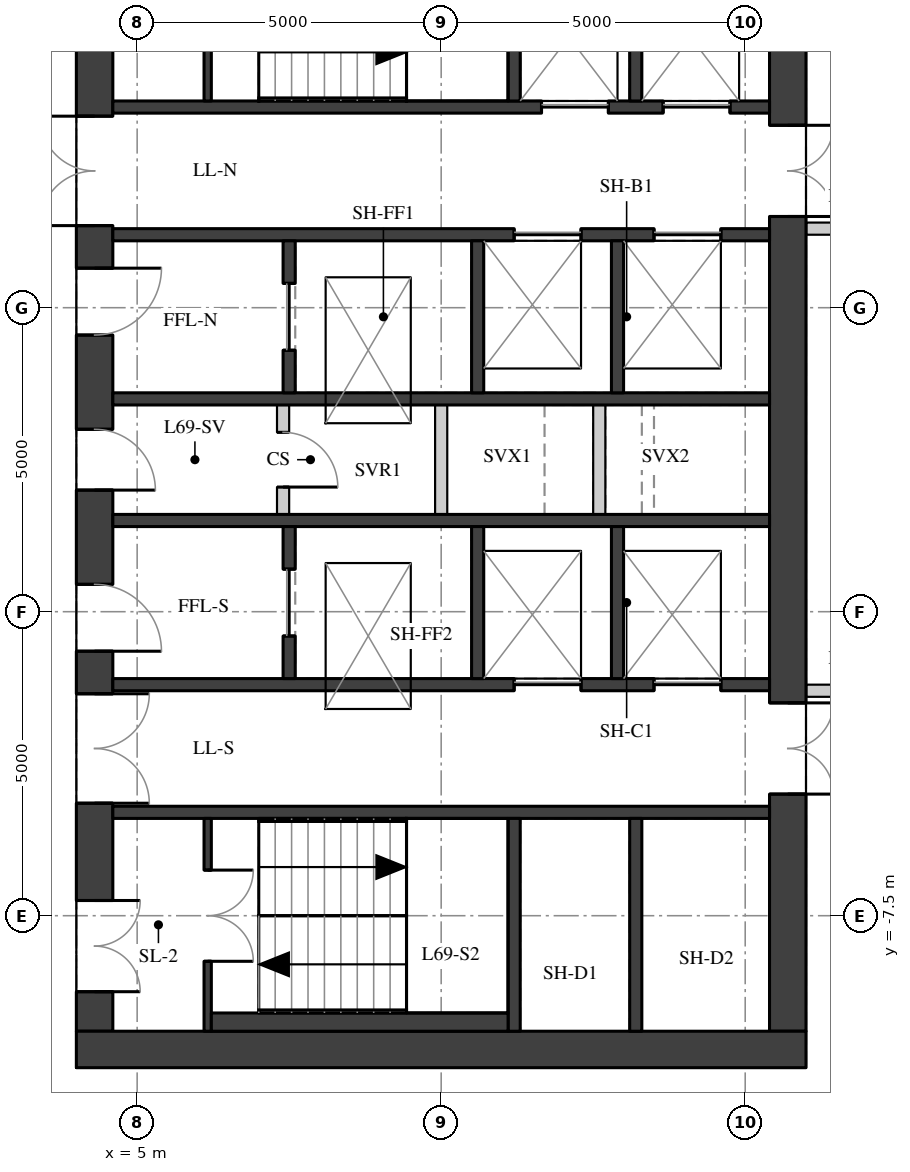
"""IFC4 building model, lengths in metres.
Left out: names, types, materials, properties, quantities, classifications, styles, units other than length and angle.
Written with IfcOpenShell. Run it as: python <this file> out.ifc"""

import sys

from ifc_helpers import new_model, si_unit, direction, frame, frame_2d, origin, place, context, subcontext, project, spatial, rectangle, extrude, element, fill, save


model = new_model("IFC4")
c1 = context("Model", 3, precision=1e-05, world=origin(), true_north=direction((0.0, 1.0)))
c2 = subcontext(c1, "Body", "Model", "MODEL_VIEW")
j1 = project(units=[si_unit("LENGTHUNIT", "METRE"), si_unit("PLANEANGLEUNIT", "RADIAN")], contexts=[c1])
p1 = place(None, origin())
s1 = spatial("IfcSite", under=j1, at=p1, CompositionType="ELEMENT")
p2 = place(p1, origin())
s2 = spatial("IfcBuilding", under=s1, at=p2, CompositionType="ELEMENT")
p3 = place(p2, frame((0.0, 0.0, 243.2)))
s3 = spatial("IfcBuildingStorey", under=s2, at=p3, CompositionType="ELEMENT", Elevation=243.2)
p4 = place(p3, frame((4.3, -9.4, 0.0), z_axis=(0.0, 0.0, 1.0), x_axis=(0.0, 1.0, 0.0)))
e1 = element("IfcWall", 1, at=p4, inside=s3, PredefinedType="SHEAR", context=c2, shape_type="SweptSolid", body=[
    extrude(rectangle(XDim=18.8, YDim=0.6, at=frame_2d((9.4, 0.0))), origin(), (0.0, 0.0, 1.0), 3.02),
])
p5 = place(p4, frame((0.65, 0.0, 0.0)))
e2 = element("IfcOpeningElement", 2, at=p5, cuts=e1, PredefinedType="OPENING", context=c2, shape_type="SweptSolid", body=[
    extrude(rectangle(XDim=1.5, YDim=2.1, at=frame_2d((0.75, 1.05))), frame((0.0, 0.31, 0.0), z_axis=(0.0, -1.0, 0.0), x_axis=(1.0, 0.0, 0.0)), (0.0, 0.0, 1.0), 0.62),
])
p6 = place(p4, frame((3.75, 0.0, 0.0)))
e3 = element("IfcOpeningElement", 3, at=p6, cuts=e1, PredefinedType="OPENING", context=c2, shape_type="SweptSolid", body=[
    extrude(rectangle(XDim=1.8, YDim=2.1, at=frame_2d((0.9, 1.05))), frame((0.0, 0.31, 0.0), z_axis=(0.0, -1.0, 0.0), x_axis=(1.0, 0.0, 0.0)), (0.0, 0.0, 1.0), 0.62),
])
p7 = place(p4, frame((6.25, 0.0, 0.0)))
e4 = element("IfcOpeningElement", 4, at=p7, cuts=e1, PredefinedType="OPENING", context=c2, shape_type="SweptSolid", body=[
    extrude(rectangle(XDim=1.1, YDim=2.1, at=frame_2d((0.55, 1.05))), frame((0.0, 0.31, 0.0), z_axis=(0.0, -1.0, 0.0), x_axis=(1.0, 0.0, 0.0)), (0.0, 0.0, 1.0), 0.62),
])
p8 = place(p4, frame((8.9, 0.0, 0.0)))
e5 = element("IfcOpeningElement", 5, at=p8, cuts=e1, PredefinedType="OPENING", context=c2, shape_type="SweptSolid", body=[
    extrude(rectangle(XDim=1.0, YDim=2.1, at=frame_2d((0.5, 1.05))), frame((0.0, 0.31, 0.0), z_axis=(0.0, -1.0, 0.0), x_axis=(1.0, 0.0, 0.0)), (0.0, 0.0, 1.0), 0.62),
])
p9 = place(p4, frame((11.45, 0.0, 0.0)))
e6 = element("IfcOpeningElement", 6, at=p9, cuts=e1, PredefinedType="OPENING", context=c2, shape_type="SweptSolid", body=[
    extrude(rectangle(XDim=1.1, YDim=2.1, at=frame_2d((0.55, 1.05))), frame((0.0, 0.31, 0.0), z_axis=(0.0, -1.0, 0.0), x_axis=(1.0, 0.0, 0.0)), (0.0, 0.0, 1.0), 0.62),
])
p10 = place(p4, frame((13.25, 0.0, 0.0)))
e7 = element("IfcOpeningElement", 7, at=p10, cuts=e1, PredefinedType="OPENING", context=c2, shape_type="SweptSolid", body=[
    extrude(rectangle(XDim=1.8, YDim=2.1, at=frame_2d((0.9, 1.05))), frame((0.0, 0.31, 0.0), z_axis=(0.0, -1.0, 0.0), x_axis=(1.0, 0.0, 0.0)), (0.0, 0.0, 1.0), 0.62),
])
p11 = place(p4, frame((16.65, 0.0, 0.0)))
e8 = element("IfcOpeningElement", 8, at=p11, cuts=e1, PredefinedType="OPENING", context=c2, shape_type="SweptSolid", body=[
    extrude(rectangle(XDim=1.5, YDim=2.1, at=frame_2d((0.75, 1.05))), frame((0.0, 0.31, 0.0), z_axis=(0.0, -1.0, 0.0), x_axis=(1.0, 0.0, 0.0)), (0.0, 0.0, 1.0), 0.62),
])
p12 = place(p3, frame((15.7, -9.4, 0.0), z_axis=(0.0, 0.0, 1.0), x_axis=(0.0, 1.0, 0.0)))
e9 = element("IfcWall", 9, at=p12, inside=s3, PredefinedType="SHEAR", context=c2, shape_type="SweptSolid", body=[
    extrude(rectangle(XDim=18.8, YDim=0.6, at=frame_2d((9.4, 0.0))), origin(), (0.0, 0.0, 1.0), 3.02),
])
p13 = place(p12, frame((13.4, 0.0, 0.0)))
e10 = element("IfcOpeningElement", 10, at=p13, cuts=e9, PredefinedType="OPENING", context=c2, shape_type="SweptSolid", body=[
    extrude(rectangle(XDim=1.5, YDim=2.1, at=frame_2d((0.75, 1.05))), frame((0.0, 0.31, 0.0), z_axis=(0.0, -1.0, 0.0), x_axis=(1.0, 0.0, 0.0)), (0.0, 0.0, 1.0), 0.62),
])
p14 = place(p12, frame((3.9, 0.0, 0.0)))
e11 = element("IfcOpeningElement", 11, at=p14, cuts=e9, PredefinedType="OPENING", context=c2, shape_type="SweptSolid", body=[
    extrude(rectangle(XDim=1.5, YDim=2.1, at=frame_2d((0.75, 1.05))), frame((0.0, 0.31, 0.0), z_axis=(0.0, -1.0, 0.0), x_axis=(1.0, 0.0, 0.0)), (0.0, 0.0, 1.0), 0.62),
])
p15 = place(p3, frame((4.0, -9.7, 0.0), z_axis=(0.0, 0.0, 1.0), x_axis=(1.0, 0.0, 0.0)))
e12 = element("IfcWall", 12, at=p15, inside=s3, PredefinedType="SHEAR", context=c2, shape_type="SweptSolid", body=[
    extrude(rectangle(XDim=12.0, YDim=0.6, at=frame_2d((6.0, 0.0))), origin(), (0.0, 0.0, 1.0), 3.02),
])
p16 = place(p3, frame((4.6, 5.8, 0.0), z_axis=(0.0, 0.0, 1.0), x_axis=(1.0, 0.0, 0.0)))
e13 = element("IfcWall", 13, at=p16, inside=s3, PredefinedType="SHEAR", context=c2, shape_type="SweptSolid", body=[
    extrude(rectangle(XDim=10.8, YDim=0.2, at=frame_2d((5.4, 0.0))), origin(), (0.0, 0.0, 1.0), 3.02),
])
p17 = place(p16, frame((7.05, 0.0, 0.0)))
e14 = element("IfcOpeningElement", 14, at=p17, cuts=e13, PredefinedType="OPENING", context=c2, shape_type="SweptSolid", body=[
    extrude(rectangle(XDim=1.1, YDim=2.1, at=frame_2d((0.55, 1.05))), frame((0.0, 0.11, 0.0), z_axis=(0.0, -1.0, 0.0), x_axis=(1.0, 0.0, 0.0)), (0.0, 0.0, 1.0), 0.22),
])
p18 = place(p16, frame((9.05, 0.0, 0.0)))
e15 = element("IfcOpeningElement", 15, at=p18, cuts=e13, PredefinedType="OPENING", context=c2, shape_type="SweptSolid", body=[
    extrude(rectangle(XDim=1.1, YDim=2.1, at=frame_2d((0.55, 1.05))), frame((0.0, 0.11, 0.0), z_axis=(0.0, -1.0, 0.0), x_axis=(1.0, 0.0, 0.0)), (0.0, 0.0, 1.0), 0.22),
])
p19 = place(p3, frame((4.6, 3.7, 0.0), z_axis=(0.0, 0.0, 1.0), x_axis=(1.0, 0.0, 0.0)))
e16 = element("IfcWall", 16, at=p19, inside=s3, PredefinedType="SHEAR", context=c2, shape_type="SweptSolid", body=[
    extrude(rectangle(XDim=10.8, YDim=0.2, at=frame_2d((5.4, 0.0))), origin(), (0.0, 0.0, 1.0), 3.02),
])
p20 = place(p19, frame((6.6, 0.0, 0.0)))
e17 = element("IfcOpeningElement", 17, at=p20, cuts=e16, PredefinedType="OPENING", context=c2, shape_type="SweptSolid", body=[
    extrude(rectangle(XDim=1.1, YDim=2.1, at=frame_2d((0.55, 1.05))), frame((0.0, 0.11, 0.0), z_axis=(0.0, -1.0, 0.0), x_axis=(1.0, 0.0, 0.0)), (0.0, 0.0, 1.0), 0.22),
])
p21 = place(p19, frame((8.9, 0.0, 0.0)))
e18 = element("IfcOpeningElement", 18, at=p21, cuts=e16, PredefinedType="OPENING", context=c2, shape_type="SweptSolid", body=[
    extrude(rectangle(XDim=1.1, YDim=2.1, at=frame_2d((0.55, 1.05))), frame((0.0, 0.11, 0.0), z_axis=(0.0, -1.0, 0.0), x_axis=(1.0, 0.0, 0.0)), (0.0, 0.0, 1.0), 0.22),
])
for number, where, z_axis, x_axis in (
    (19, (4.6, 1.0, 0.0), (0.0, 0.0, 1.0), (1.0, 0.0, 0.0)),
    (20, (4.6, -1.0, 0.0), (0.0, 0.0, 1.0), (1.0, 0.0, 0.0)),
):
    element("IfcWall", number, at=place(p3, frame(where, z_axis=z_axis, x_axis=x_axis)), inside=s3, PredefinedType="SHEAR", context=c2, shape_type="SweptSolid", body=[
        extrude(rectangle(XDim=10.8, YDim=0.2, at=frame_2d((5.4, 0.0))), origin(), (0.0, 0.0, 1.0), 3.02),
    ])
p22 = place(p3, frame((4.6, -3.7, 0.0), z_axis=(0.0, 0.0, 1.0), x_axis=(1.0, 0.0, 0.0)))
e21 = element("IfcWall", 21, at=p22, inside=s3, PredefinedType="SHEAR", context=c2, shape_type="SweptSolid", body=[
    extrude(rectangle(XDim=10.8, YDim=0.2, at=frame_2d((5.4, 0.0))), origin(), (0.0, 0.0, 1.0), 3.02),
])
p23 = place(p22, frame((6.6, 0.0, 0.0)))
e22 = element("IfcOpeningElement", 22, at=p23, cuts=e21, PredefinedType="OPENING", context=c2, shape_type="SweptSolid", body=[
    extrude(rectangle(XDim=1.1, YDim=2.1, at=frame_2d((0.55, 1.05))), frame((0.0, 0.11, 0.0), z_axis=(0.0, -1.0, 0.0), x_axis=(1.0, 0.0, 0.0)), (0.0, 0.0, 1.0), 0.22),
])
p24 = place(p22, frame((8.9, 0.0, 0.0)))
e23 = element("IfcOpeningElement", 23, at=p24, cuts=e21, PredefinedType="OPENING", context=c2, shape_type="SweptSolid", body=[
    extrude(rectangle(XDim=1.1, YDim=2.1, at=frame_2d((0.55, 1.05))), frame((0.0, 0.11, 0.0), z_axis=(0.0, -1.0, 0.0), x_axis=(1.0, 0.0, 0.0)), (0.0, 0.0, 1.0), 0.22),
])
p25 = place(p3, frame((4.6, -5.8, 0.0), z_axis=(0.0, 0.0, 1.0), x_axis=(1.0, 0.0, 0.0)))
e24 = element("IfcWall", 24, at=p25, inside=s3, PredefinedType="SHEAR", context=c2, shape_type="SweptSolid", body=[
    extrude(rectangle(XDim=10.8, YDim=0.2, at=frame_2d((5.4, 0.0))), origin(), (0.0, 0.0, 1.0), 3.02),
])
for number, where, z_axis, x_axis in (
    (25, (11.2, 5.9, 0.0), (0.0, 0.0, 1.0), (0.0, 1.0, 0.0)),
    (26, (11.2, -9.4, 0.0), (0.0, 0.0, 1.0), (0.0, 1.0, 0.0)),
    (27, (13.2, 5.9, 0.0), (0.0, 0.0, 1.0), (0.0, 1.0, 0.0)),
    (28, (13.2, -9.4, 0.0), (0.0, 0.0, 1.0), (0.0, 1.0, 0.0)),
):
    element("IfcWall", number, at=place(p3, frame(where, z_axis=z_axis, x_axis=x_axis)), inside=s3, PredefinedType="SHEAR", context=c2, shape_type="SweptSolid", body=[
        extrude(rectangle(XDim=3.5, YDim=0.2, at=frame_2d((1.75, 0.0))), origin(), (0.0, 0.0, 1.0), 3.02),
    ])
p26 = place(p3, frame((7.5, 1.1, 0.0), z_axis=(0.0, 0.0, 1.0), x_axis=(0.0, 1.0, 0.0)))
e29 = element("IfcWall", 29, at=p26, inside=s3, PredefinedType="SHEAR", context=c2, shape_type="SweptSolid", body=[
    extrude(rectangle(XDim=2.5, YDim=0.2, at=frame_2d((1.25, 0.0))), origin(), (0.0, 0.0, 1.0), 3.02),
])
p27 = place(p26, frame((0.7, 0.0, 0.0)))
e30 = element("IfcOpeningElement", 30, at=p27, cuts=e29, PredefinedType="OPENING", context=c2, shape_type="SweptSolid", body=[
    extrude(rectangle(XDim=1.1, YDim=2.1, at=frame_2d((0.55, 1.05))), frame((0.0, 0.11, 0.0), z_axis=(0.0, -1.0, 0.0), x_axis=(1.0, 0.0, 0.0)), (0.0, 0.0, 1.0), 0.22),
])
p28 = place(p3, frame((7.5, -3.6, 0.0), z_axis=(0.0, 0.0, 1.0), x_axis=(0.0, 1.0, 0.0)))
e31 = element("IfcWall", 31, at=p28, inside=s3, PredefinedType="SHEAR", context=c2, shape_type="SweptSolid", body=[
    extrude(rectangle(XDim=2.5, YDim=0.2, at=frame_2d((1.25, 0.0))), origin(), (0.0, 0.0, 1.0), 3.02),
])
p29 = place(p28, frame((0.7, 0.0, 0.0)))
e32 = element("IfcOpeningElement", 32, at=p29, cuts=e31, PredefinedType="OPENING", context=c2, shape_type="SweptSolid", body=[
    extrude(rectangle(XDim=1.1, YDim=2.1, at=frame_2d((0.55, 1.05))), frame((0.0, 0.11, 0.0), z_axis=(0.0, -1.0, 0.0), x_axis=(1.0, 0.0, 0.0)), (0.0, 0.0, 1.0), 0.22),
])
for number, where, z_axis, x_axis in (
    (33, (10.6, 1.1, 0.0), (0.0, 0.0, 1.0), (0.0, 1.0, 0.0)),
    (34, (10.6, -3.6, 0.0), (0.0, 0.0, 1.0), (0.0, 1.0, 0.0)),
    (35, (12.9, 1.1, 0.0), (0.0, 0.0, 1.0), (0.0, 1.0, 0.0)),
    (36, (12.9, -3.6, 0.0), (0.0, 0.0, 1.0), (0.0, 1.0, 0.0)),
):
    element("IfcWall", number, at=place(p3, frame(where, z_axis=z_axis, x_axis=x_axis)), inside=s3, PredefinedType="SHEAR", context=c2, shape_type="SweptSolid", body=[
        extrude(rectangle(XDim=2.5, YDim=0.2, at=frame_2d((1.25, 0.0))), origin(), (0.0, 0.0, 1.0), 3.02),
    ])
p30 = place(p3, frame((6.16, 5.9, 0.0), z_axis=(0.0, 0.0, 1.0), x_axis=(0.0, 1.0, 0.0)))
e37 = element("IfcWall", 37, at=p30, inside=s3, PredefinedType="SHEAR", context=c2, shape_type="SweptSolid", body=[
    extrude(rectangle(XDim=3.5, YDim=0.12, at=frame_2d((1.75, 0.0))), origin(), (0.0, 0.0, 1.0), 3.02),
])
p31 = place(p30, frame((0.85, 0.0, 0.0)))
e38 = element("IfcOpeningElement", 38, at=p31, cuts=e37, PredefinedType="OPENING", context=c2, shape_type="SweptSolid", body=[
    extrude(rectangle(XDim=1.5, YDim=2.1, at=frame_2d((0.75, 1.05))), frame((0.0, 0.07, 0.0), z_axis=(0.0, -1.0, 0.0), x_axis=(1.0, 0.0, 0.0)), (0.0, 0.0, 1.0), 0.14),
])
p32 = place(p3, frame((6.16, -9.4, 0.0), z_axis=(0.0, 0.0, 1.0), x_axis=(0.0, 1.0, 0.0)))
e39 = element("IfcWall", 39, at=p32, inside=s3, PredefinedType="SHEAR", context=c2, shape_type="SweptSolid", body=[
    extrude(rectangle(XDim=3.5, YDim=0.12, at=frame_2d((1.75, 0.0))), origin(), (0.0, 0.0, 1.0), 3.02),
])
p33 = place(p32, frame((1.15, 0.0, 0.0)))
e40 = element("IfcOpeningElement", 40, at=p33, cuts=e39, PredefinedType="OPENING", context=c2, shape_type="SweptSolid", body=[
    extrude(rectangle(XDim=1.5, YDim=2.1, at=frame_2d((0.75, 1.05))), frame((0.0, 0.07, 0.0), z_axis=(0.0, -1.0, 0.0), x_axis=(1.0, 0.0, 0.0)), (0.0, 0.0, 1.0), 0.14),
])
p34 = place(p3, frame((7.4, -0.9, 0.0), z_axis=(0.0, 0.0, 1.0), x_axis=(0.0, 1.0, 0.0)))
e41 = element("IfcWall", 41, at=p34, inside=s3, PredefinedType="PARTITIONING", context=c2, shape_type="SweptSolid", body=[
    extrude(rectangle(XDim=1.8, YDim=0.2, at=frame_2d((0.9, 0.0))), origin(), (0.0, 0.0, 1.0), 3.02),
])
p35 = place(p34, frame((0.45, 0.0, 0.0)))
e42 = element("IfcOpeningElement", 42, at=p35, cuts=e41, PredefinedType="OPENING", context=c2, shape_type="SweptSolid", body=[
    extrude(rectangle(XDim=0.9, YDim=2.1, at=frame_2d((0.45, 1.05))), frame((0.0, 0.11, 0.0), z_axis=(0.0, -1.0, 0.0), x_axis=(1.0, 0.0, 0.0)), (0.0, 0.0, 1.0), 0.22),
])
for number, where, z_axis, x_axis in (
    (43, (10.0, -0.9, 0.0), (0.0, 0.0, 1.0), (0.0, 1.0, 0.0)),
    (44, (12.6, -0.9, 0.0), (0.0, 0.0, 1.0), (0.0, 1.0, 0.0)),
):
    element("IfcWall", number, at=place(p3, frame(where, z_axis=z_axis, x_axis=x_axis)), inside=s3, PredefinedType="PARTITIONING", context=c2, shape_type="SweptSolid", body=[
        extrude(rectangle(XDim=1.8, YDim=0.2, at=frame_2d((0.9, 0.0))), origin(), (0.0, 0.0, 1.0), 3.02),
    ])
p36 = place(p3, frame((6.22, -9.25, 0.0), z_axis=(0.0, 0.0, 1.0), x_axis=(1.0, 0.0, 0.0)))
e45 = element("IfcWall", 45, at=p36, inside=s3, PredefinedType="PARTITIONING", context=c2, shape_type="SweptSolid", body=[
    extrude(rectangle(XDim=4.88, YDim=0.3, at=frame_2d((2.44, 0.0))), origin(), (0.0, 0.0, 1.0), 3.02),
])
for number, where, z_axis, x_axis in (
    (46, (17.6, 3.8, 0.0), (0.0, 0.0, 1.0), (-1.0, 0.0, 0.0)),
    (47, (16.004, -3.8, 0.0), (0.0, 0.0, 1.0), (1.0, 0.0, 0.0)),
):
    element("IfcWall", number, at=place(p3, frame(where, z_axis=z_axis, x_axis=x_axis)), inside=s3, PredefinedType="PARTITIONING", context=c2, shape_type="SweptSolid", body=[
        extrude(rectangle(XDim=1.596, YDim=0.2, at=frame_2d((0.798, 0.0))), origin(), (0.0, 0.0, 1.0), 2.57),
    ])
p37 = place(p5, origin())
e48 = element("IfcDoor", 48, at=p37, inside=s3, OperationType="DOUBLE_DOOR_SINGLE_SWING", PredefinedType="DOOR", context=c2, shape_type="SweptSolid", body=[
    extrude(rectangle(XDim=1.5, YDim=2.1, at=frame_2d((0.75, 1.05))), frame((0.0, 0.025, 0.0), z_axis=(0.0, -1.0, 0.0), x_axis=(1.0, 0.0, 0.0)), (0.0, 0.0, 1.0), 0.05),
])
fill(e2, e48)
p38 = place(p6, origin())
e49 = element("IfcDoor", 49, at=p38, inside=s3, OperationType="DOUBLE_DOOR_SINGLE_SWING", PredefinedType="DOOR", context=c2, shape_type="SweptSolid", body=[
    extrude(rectangle(XDim=1.8, YDim=2.1, at=frame_2d((0.9, 1.05))), frame((0.0, 0.025, 0.0), z_axis=(0.0, -1.0, 0.0), x_axis=(1.0, 0.0, 0.0)), (0.0, 0.0, 1.0), 0.05),
])
fill(e3, e49)
p39 = place(p7, origin())
e50 = element("IfcDoor", 50, at=p39, inside=s3, OperationType="SINGLE_SWING_RIGHT", PredefinedType="DOOR", context=c2, shape_type="SweptSolid", body=[
    extrude(rectangle(XDim=1.1, YDim=2.1, at=frame_2d((0.55, 1.05))), frame((0.0, 0.025, 0.0), z_axis=(0.0, -1.0, 0.0), x_axis=(1.0, 0.0, 0.0)), (0.0, 0.0, 1.0), 0.05),
])
fill(e4, e50)
p40 = place(p8, origin())
e51 = element("IfcDoor", 51, at=p40, inside=s3, OperationType="SINGLE_SWING_RIGHT", PredefinedType="DOOR", context=c2, shape_type="SweptSolid", body=[
    extrude(rectangle(XDim=1.0, YDim=2.1, at=frame_2d((0.5, 1.05))), frame((0.0, 0.025, 0.0), z_axis=(0.0, -1.0, 0.0), x_axis=(1.0, 0.0, 0.0)), (0.0, 0.0, 1.0), 0.05),
])
fill(e5, e51)
p41 = place(p9, origin())
e52 = element("IfcDoor", 52, at=p41, inside=s3, OperationType="SINGLE_SWING_LEFT", PredefinedType="DOOR", context=c2, shape_type="SweptSolid", body=[
    extrude(rectangle(XDim=1.1, YDim=2.1, at=frame_2d((0.55, 1.05))), frame((0.0, 0.025, 0.0), z_axis=(0.0, -1.0, 0.0), x_axis=(1.0, 0.0, 0.0)), (0.0, 0.0, 1.0), 0.05),
])
fill(e6, e52)
p42 = place(p10, origin())
e53 = element("IfcDoor", 53, at=p42, inside=s3, OperationType="DOUBLE_DOOR_SINGLE_SWING", PredefinedType="DOOR", context=c2, shape_type="SweptSolid", body=[
    extrude(rectangle(XDim=1.8, YDim=2.1, at=frame_2d((0.9, 1.05))), frame((0.0, 0.025, 0.0), z_axis=(0.0, -1.0, 0.0), x_axis=(1.0, 0.0, 0.0)), (0.0, 0.0, 1.0), 0.05),
])
fill(e7, e53)
p43 = place(p13, origin())
e54 = element("IfcDoor", 54, at=p43, inside=s3, OperationType="DOUBLE_DOOR_SINGLE_SWING", PredefinedType="DOOR", context=c2, shape_type="SweptSolid", body=[
    extrude(rectangle(XDim=1.5, YDim=2.1, at=frame_2d((0.75, 1.05))), frame((0.0, 0.025, 0.0), z_axis=(0.0, -1.0, 0.0), x_axis=(1.0, 0.0, 0.0)), (0.0, 0.0, 1.0), 0.05),
])
fill(e10, e54)
p44 = place(p14, origin())
e55 = element("IfcDoor", 55, at=p44, inside=s3, OperationType="DOUBLE_DOOR_SINGLE_SWING", PredefinedType="DOOR", context=c2, shape_type="SweptSolid", body=[
    extrude(rectangle(XDim=1.5, YDim=2.1, at=frame_2d((0.75, 1.05))), frame((0.0, 0.025, 0.0), z_axis=(0.0, -1.0, 0.0), x_axis=(1.0, 0.0, 0.0)), (0.0, 0.0, 1.0), 0.05),
])
fill(e11, e55)
p45 = place(p33, origin())
e56 = element("IfcDoor", 56, at=p45, inside=s3, OperationType="DOUBLE_DOOR_SINGLE_SWING", PredefinedType="DOOR", context=c2, shape_type="SweptSolid", body=[
    extrude(rectangle(XDim=1.5, YDim=2.1, at=frame_2d((0.75, 1.05))), frame((0.0, 0.025, 0.0), z_axis=(0.0, -1.0, 0.0), x_axis=(1.0, 0.0, 0.0)), (0.0, 0.0, 1.0), 0.05),
])
fill(e40, e56)
p46 = place(p17, origin())
e57 = element("IfcDoor", 57, at=p46, inside=s3, OperationType="DOUBLE_DOOR_SLIDING", PredefinedType="DOOR", context=c2, shape_type="SweptSolid", body=[
    extrude(rectangle(XDim=1.1, YDim=2.1, at=frame_2d((0.55, 1.05))), frame((0.0, 0.025, 0.0), z_axis=(0.0, -1.0, 0.0), x_axis=(1.0, 0.0, 0.0)), (0.0, 0.0, 1.0), 0.05),
])
fill(e14, e57)
p47 = place(p18, origin())
e58 = element("IfcDoor", 58, at=p47, inside=s3, OperationType="DOUBLE_DOOR_SLIDING", PredefinedType="DOOR", context=c2, shape_type="SweptSolid", body=[
    extrude(rectangle(XDim=1.1, YDim=2.1, at=frame_2d((0.55, 1.05))), frame((0.0, 0.025, 0.0), z_axis=(0.0, -1.0, 0.0), x_axis=(1.0, 0.0, 0.0)), (0.0, 0.0, 1.0), 0.05),
])
fill(e15, e58)
p48 = place(p20, origin())
e59 = element("IfcDoor", 59, at=p48, inside=s3, OperationType="DOUBLE_DOOR_SLIDING", PredefinedType="DOOR", context=c2, shape_type="SweptSolid", body=[
    extrude(rectangle(XDim=1.1, YDim=2.1, at=frame_2d((0.55, 1.05))), frame((0.0, 0.025, 0.0), z_axis=(0.0, -1.0, 0.0), x_axis=(1.0, 0.0, 0.0)), (0.0, 0.0, 1.0), 0.05),
])
fill(e17, e59)
p49 = place(p21, origin())
e60 = element("IfcDoor", 60, at=p49, inside=s3, OperationType="DOUBLE_DOOR_SLIDING", PredefinedType="DOOR", context=c2, shape_type="SweptSolid", body=[
    extrude(rectangle(XDim=1.1, YDim=2.1, at=frame_2d((0.55, 1.05))), frame((0.0, 0.025, 0.0), z_axis=(0.0, -1.0, 0.0), x_axis=(1.0, 0.0, 0.0)), (0.0, 0.0, 1.0), 0.05),
])
fill(e18, e60)
p50 = place(p23, origin())
e61 = element("IfcDoor", 61, at=p50, inside=s3, OperationType="DOUBLE_DOOR_SLIDING", PredefinedType="DOOR", context=c2, shape_type="SweptSolid", body=[
    extrude(rectangle(XDim=1.1, YDim=2.1, at=frame_2d((0.55, 1.05))), frame((0.0, 0.025, 0.0), z_axis=(0.0, -1.0, 0.0), x_axis=(1.0, 0.0, 0.0)), (0.0, 0.0, 1.0), 0.05),
])
fill(e22, e61)
p51 = place(p24, origin())
e62 = element("IfcDoor", 62, at=p51, inside=s3, OperationType="DOUBLE_DOOR_SLIDING", PredefinedType="DOOR", context=c2, shape_type="SweptSolid", body=[
    extrude(rectangle(XDim=1.1, YDim=2.1, at=frame_2d((0.55, 1.05))), frame((0.0, 0.025, 0.0), z_axis=(0.0, -1.0, 0.0), x_axis=(1.0, 0.0, 0.0)), (0.0, 0.0, 1.0), 0.05),
])
fill(e23, e62)
p52 = place(p27, origin())
e63 = element("IfcDoor", 63, at=p52, inside=s3, OperationType="DOUBLE_DOOR_SLIDING", PredefinedType="DOOR", context=c2, shape_type="SweptSolid", body=[
    extrude(rectangle(XDim=1.1, YDim=2.1, at=frame_2d((0.55, 1.05))), frame((0.0, 0.025, 0.0), z_axis=(0.0, -1.0, 0.0), x_axis=(1.0, 0.0, 0.0)), (0.0, 0.0, 1.0), 0.05),
])
fill(e30, e63)
p53 = place(p29, origin())
e64 = element("IfcDoor", 64, at=p53, inside=s3, OperationType="DOUBLE_DOOR_SLIDING", PredefinedType="DOOR", context=c2, shape_type="SweptSolid", body=[
    extrude(rectangle(XDim=1.1, YDim=2.1, at=frame_2d((0.55, 1.05))), frame((0.0, 0.025, 0.0), z_axis=(0.0, -1.0, 0.0), x_axis=(1.0, 0.0, 0.0)), (0.0, 0.0, 1.0), 0.05),
])
fill(e32, e64)
p54 = place(p35, origin())
e65 = element("IfcDoor", 65, at=p54, inside=s3, OperationType="SINGLE_SWING_RIGHT", PredefinedType="DOOR", context=c2, shape_type="SweptSolid", body=[
    extrude(rectangle(XDim=0.9, YDim=2.1, at=frame_2d((0.45, 1.05))), frame((0.0, 0.025, 0.0), z_axis=(0.0, -1.0, 0.0), x_axis=(1.0, 0.0, 0.0)), (0.0, 0.0, 1.0), 0.05),
])
fill(e42, e65)
save(model, sys.argv[1])
